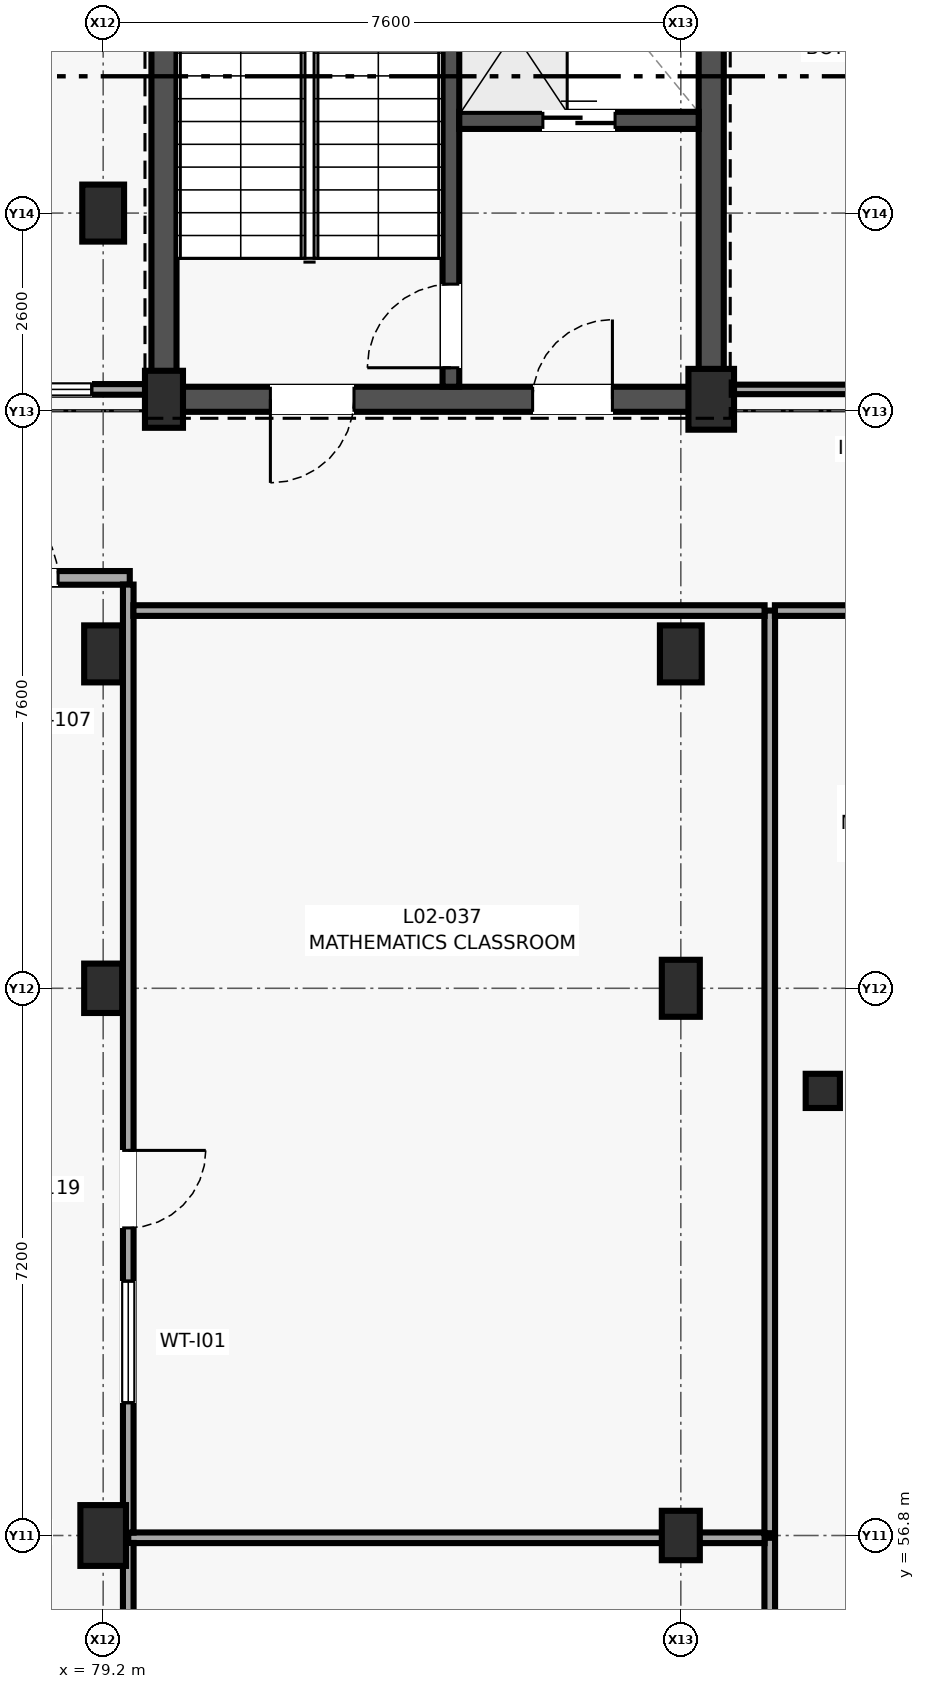
"""IFC4 building model, lengths in metres.
Left out: names, types, materials, properties, quantities, classifications, styles, units other than length and angle.
Written with IfcOpenShell. Run it as: python <this file> out.ifc"""

import sys

from ifc_helpers import new_model, si_unit, direction, frame, frame_2d, origin, origin_2d, place, context, subcontext, project, spatial, rectangle, circle, extrude, element, fill, save


model = new_model("IFC4")
c1 = context("Model", 3, precision=1e-05, world=origin(), true_north=direction((0.0, 1.0)))
c2 = subcontext(c1, "Body", "Model", "MODEL_VIEW")
j1 = project(units=[si_unit("LENGTHUNIT", "METRE"), si_unit("PLANEANGLEUNIT", "RADIAN")], contexts=[c1])
p1 = place(None, origin())
s1 = spatial("IfcSite", under=j1, at=p1, CompositionType="ELEMENT")
p2 = place(p1, origin())
s2 = spatial("IfcBuilding", under=s1, at=p2, CompositionType="ELEMENT")
p3 = place(p2, frame((0.0, 0.0, 8.2)))
s3 = spatial("IfcBuildingStorey", under=s2, at=p3, CompositionType="ELEMENT", Elevation=8.2)
p4 = place(p3, frame((79.2, 56.8, 0.0), z_axis=(0.0, 0.0, 1.0), x_axis=(1.0, 0.0, 0.0)))
e1 = element("IfcColumn", 1, at=p4, inside=s3, PredefinedType="COLUMN", context=c2, shape_type="SweptSolid", body=[
    extrude(rectangle(XDim=0.6, YDim=0.8, at=origin_2d()), origin(), (0.0, 0.0, 1.0), 4.0),
])
p5 = place(p3, frame((79.2, 64.0, 0.0), z_axis=(0.0, 0.0, 1.0), x_axis=(1.0, 0.0, 0.0)))
e2 = element("IfcColumn", 2, at=p5, inside=s3, PredefinedType="COLUMN", context=c2, shape_type="SweptSolid", body=[
    extrude(rectangle(XDim=0.5, YDim=0.65, at=origin_2d()), origin(), (0.0, 0.0, 1.0), 4.0),
])
p6 = place(p3, frame((79.2, 68.4, 0.0), z_axis=(0.0, 0.0, 1.0), x_axis=(1.0, 0.0, 0.0)))
e3 = element("IfcColumn", 3, at=p6, inside=s3, PredefinedType="COLUMN", context=c2, shape_type="SweptSolid", body=[
    extrude(rectangle(XDim=0.5, YDim=0.75, at=origin_2d()), origin(), (0.0, 0.0, 1.0), 4.0),
])
p7 = place(p3, frame((79.2, 74.2, 0.0), z_axis=(0.0, 0.0, 1.0), x_axis=(1.0, 0.0, 0.0)))
e4 = element("IfcColumn", 4, at=p7, inside=s3, PredefinedType="COLUMN", context=c2, shape_type="SweptSolid", body=[
    extrude(rectangle(XDim=0.55, YDim=0.75, at=origin_2d()), origin(), (0.0, 0.0, 1.0), 4.0),
])
p8 = place(p3, frame((80.0, 71.75, 0.0), z_axis=(0.0, 0.0, 1.0), x_axis=(1.0, 0.0, 0.0)))
e5 = element("IfcColumn", 5, at=p8, inside=s3, PredefinedType="COLUMN", context=c2, shape_type="SweptSolid", body=[
    extrude(rectangle(XDim=0.5, YDim=0.75, at=origin_2d()), origin(), (0.0, 0.0, 1.0), 4.0),
])
p9 = place(p3, frame((86.8, 56.8, 0.0), z_axis=(0.0, 0.0, 1.0), x_axis=(1.0, 0.0, 0.0)))
e6 = element("IfcColumn", 6, at=p9, inside=s3, PredefinedType="COLUMN", context=c2, shape_type="SweptSolid", body=[
    extrude(rectangle(XDim=0.5, YDim=0.65, at=origin_2d()), origin(), (0.0, 0.0, 1.0), 4.0),
])
p10 = place(p3, frame((86.8, 64.0, 0.0), z_axis=(0.0, 0.0, 1.0), x_axis=(1.0, 0.0, 0.0)))
e7 = element("IfcColumn", 7, at=p10, inside=s3, PredefinedType="COLUMN", context=c2, shape_type="SweptSolid", body=[
    extrude(rectangle(XDim=0.5, YDim=0.75, at=origin_2d()), origin(), (0.0, 0.0, 1.0), 4.0),
])
p11 = place(p3, frame((86.8, 68.4, 0.0), z_axis=(0.0, 0.0, 1.0), x_axis=(1.0, 0.0, 0.0)))
e8 = element("IfcColumn", 8, at=p11, inside=s3, PredefinedType="COLUMN", context=c2, shape_type="SweptSolid", body=[
    extrude(rectangle(XDim=0.55, YDim=0.75, at=origin_2d()), origin(), (0.0, 0.0, 1.0), 4.0),
])
p12 = place(p3, frame((87.2, 71.75, 0.0), z_axis=(0.0, 0.0, 1.0), x_axis=(1.0, 0.0, 0.0)))
e9 = element("IfcColumn", 9, at=p12, inside=s3, PredefinedType="COLUMN", context=c2, shape_type="SweptSolid", body=[
    extrude(rectangle(XDim=0.6, YDim=0.8, at=origin_2d()), origin(), (0.0, 0.0, 1.0), 4.0),
])
p13 = place(p3, frame((88.668, 62.65, 0.0), z_axis=(0.0, 0.0, 1.0), x_axis=(1.0, 0.0, 0.0)))
e10 = element("IfcColumn", 10, at=p13, inside=s3, PredefinedType="COLUMN", context=c2, shape_type="SweptSolid", body=[
    extrude(circle(Radius=0.225, at=origin_2d()), origin(), (0.0, 0.0, 1.0), 4.0),
])
p14 = place(p3, frame((79.835, 71.75, 0.0), z_axis=(0.0, 0.0, 1.0), x_axis=(1.0, 0.0, 0.0)))
e11 = element("IfcWall", 11, at=p14, inside=s3, PredefinedType="SHEAR", context=c2, shape_type="SweptSolid", body=[
    extrude(rectangle(XDim=7.53, YDim=0.33, at=frame_2d((3.765, 0.0))), origin(), (0.0, 0.0, 1.0), 3.78),
])
p15 = place(p14, frame((5.015, 0.0, 0.0)))
e12 = element("IfcOpeningElement", 12, at=p15, cuts=e11, PredefinedType="OPENING", context=c2, shape_type="SweptSolid", body=[
    extrude(rectangle(XDim=1.05, YDim=2.15, at=frame_2d((0.525, 1.075))), frame((0.0, 0.175, 0.0), z_axis=(0.0, -1.0, 0.0), x_axis=(1.0, 0.0, 0.0)), (0.0, 0.0, 1.0), 0.35),
])
p16 = place(p14, frame((1.565, 0.0, 0.0)))
e13 = element("IfcOpeningElement", 13, at=p16, cuts=e11, PredefinedType="OPENING", context=c2, shape_type="SweptSolid", body=[
    extrude(rectangle(XDim=1.1, YDim=2.15, at=frame_2d((0.55, 1.075))), frame((0.0, 0.175, 0.0), z_axis=(0.0, -1.0, 0.0), x_axis=(1.0, 0.0, 0.0)), (0.0, 0.0, 1.0), 0.35),
])
for number, where, z_axis, x_axis in (
    (14, (80.0, 71.915, 0.0), (0.0, 0.0, 1.0), (0.0, 1.0, 0.0)),
    (15, (87.2, 71.915, 0.0), (0.0, 0.0, 1.0), (0.0, 1.0, 0.0)),
):
    element("IfcWall", number, at=place(p3, frame(where, z_axis=z_axis, x_axis=x_axis)), inside=s3, PredefinedType="SHEAR", context=c2, shape_type="SweptSolid", body=[
        extrude(rectangle(XDim=7.47, YDim=0.33, at=frame_2d((3.735, 0.0))), origin(), (0.0, 0.0, 1.0), 3.78),
    ])
p17 = place(p3, frame((83.775, 71.915, 0.0), z_axis=(0.0, 0.0, 1.0), x_axis=(0.0, 1.0, 0.0)))
e16 = element("IfcWall", 16, at=p17, inside=s3, PredefinedType="SHEAR", context=c2, shape_type="SweptSolid", body=[
    extrude(rectangle(XDim=7.47, YDim=0.22, at=frame_2d((3.735, 0.0))), origin(), (0.0, 0.0, 1.0), 3.78),
])
p18 = place(p17, frame((0.25, 0.0, 0.0)))
e17 = element("IfcOpeningElement", 17, at=p18, cuts=e16, PredefinedType="OPENING", context=c2, shape_type="SweptSolid", body=[
    extrude(rectangle(XDim=1.1, YDim=2.15, at=frame_2d((0.55, 1.075))), frame((0.0, 0.12, 0.0), z_axis=(0.0, -1.0, 0.0), x_axis=(1.0, 0.0, 0.0)), (0.0, 0.0, 1.0), 0.24),
])
p19 = place(p3, frame((83.885, 75.42, 0.0), z_axis=(0.0, 0.0, 1.0), x_axis=(1.0, 0.0, 0.0)))
e18 = element("IfcWall", 18, at=p19, inside=s3, PredefinedType="SHEAR", context=c2, shape_type="SweptSolid", body=[
    extrude(rectangle(XDim=3.15, YDim=0.225, at=frame_2d((1.575, 0.0))), origin(), (0.0, 0.0, 1.0), 3.78),
])
p20 = place(p19, frame((1.1, 0.0, 0.0)))
e19 = element("IfcOpeningElement", 19, at=p20, cuts=e18, PredefinedType="OPENING", context=c2, shape_type="SweptSolid", body=[
    extrude(rectangle(XDim=0.95, YDim=2.15, at=frame_2d((0.475, 1.075))), frame((0.0, 0.123, 0.0), z_axis=(0.0, -1.0, 0.0), x_axis=(1.0, 0.0, 0.0)), (0.0, 0.0, 1.0), 0.245),
])
p21 = place(p3, frame((77.05, 69.4, 0.0), z_axis=(0.0, 0.0, 1.0), x_axis=(1.0, 0.0, 0.0)))
e20 = element("IfcWall", 20, at=p21, inside=s3, PredefinedType="PARTITIONING", context=c2, shape_type="SweptSolid", body=[
    extrude(rectangle(XDim=2.5, YDim=0.18, at=frame_2d((1.25, 0.0))), origin(), (0.0, 0.0, 1.0), 3.78),
])
p22 = place(p21, frame((0.507, 0.0, 0.0)))
e21 = element("IfcOpeningElement", 21, at=p22, cuts=e20, PredefinedType="OPENING", context=c2, shape_type="SweptSolid", body=[
    extrude(rectangle(XDim=1.05, YDim=2.15, at=frame_2d((0.525, 1.075))), frame((0.0, 0.1, 0.0), z_axis=(0.0, -1.0, 0.0), x_axis=(1.0, 0.0, 0.0)), (0.0, 0.0, 1.0), 0.2),
])
p23 = place(p3, frame((87.97, 44.698, 0.0), z_axis=(0.0, 0.0, 1.0), x_axis=(0.0, 1.0, 0.0)))
e22 = element("IfcWall", 22, at=p23, inside=s3, PredefinedType="PARTITIONING", context=c2, shape_type="SweptSolid", body=[
    extrude(rectangle(XDim=12.072, YDim=0.14, at=frame_2d((6.036, 0.0))), origin(), (0.0, 0.0, 1.0), 3.775),
])
p24 = place(p3, frame((87.902, 56.77, 0.0), z_axis=(0.0, 0.0, 1.0), x_axis=(-1.0, 0.0, 0.0)))
e23 = element("IfcWall", 23, at=p24, inside=s3, PredefinedType="PARTITIONING", context=c2, shape_type="SweptSolid", body=[
    extrude(rectangle(XDim=8.372, YDim=0.14, at=frame_2d((4.186, 0.0))), origin(), (0.0, 0.0, 1.0), 2.975),
])
p25 = place(p3, frame((79.53, 56.702, 0.0), z_axis=(0.0, 0.0, 1.0), x_axis=(0.0, -1.0, 0.0)))
e24 = element("IfcWall", 24, at=p25, inside=s3, PredefinedType="PARTITIONING", context=c2, shape_type="SweptSolid", body=[
    extrude(rectangle(XDim=12.004, YDim=0.14, at=frame_2d((6.002, 0.0))), origin(), (0.0, 0.0, 1.0), 3.775),
])
p26 = place(p25, frame((3.809, 0.0, 0.0)))
e25 = element("IfcOpeningElement", 25, at=p26, cuts=e24, PredefinedType="OPENING", context=c2, shape_type="SweptSolid", body=[
    extrude(rectangle(XDim=1.12, YDim=2.18, at=frame_2d((0.56, 1.09))), frame((0.0, 0.08, 0.0), z_axis=(0.0, -1.0, 0.0), x_axis=(1.0, 0.0, 0.0)), (0.0, 0.0, 1.0), 0.16),
])
p27 = place(p3, frame((79.53, 69.312, 0.0), z_axis=(0.0, 0.0, 1.0), x_axis=(0.0, -1.0, 0.0)))
e26 = element("IfcWall", 26, at=p27, inside=s3, PredefinedType="PARTITIONING", context=c2, shape_type="SweptSolid", body=[
    extrude(rectangle(XDim=12.474, YDim=0.14, at=frame_2d((6.237, 0.0))), origin(), (0.0, 0.0, 1.0), 3.775),
])
p28 = place(p27, frame((7.445, 0.0, 0.0)))
e27 = element("IfcOpeningElement", 27, at=p28, cuts=e26, PredefinedType="OPENING", context=c2, shape_type="SweptSolid", body=[
    extrude(rectangle(XDim=1.02, YDim=2.14, at=frame_2d((0.51, 1.07))), frame((0.0, 0.08, 0.0), z_axis=(0.0, -1.0, 0.0), x_axis=(1.0, 0.0, 0.0)), (0.0, 0.0, 1.0), 0.16),
])
p29 = place(p27, frame((9.165, 0.0, 1.05)))
e28 = element("IfcOpeningElement", 28, at=p29, cuts=e26, PredefinedType="OPENING", context=c2, shape_type="SweptSolid", body=[
    extrude(rectangle(XDim=1.6, YDim=1.1, at=frame_2d((0.8, 0.55))), frame((0.0, 0.08, 0.0), z_axis=(0.0, -1.0, 0.0), x_axis=(1.0, 0.0, 0.0)), (0.0, 0.0, 1.0), 0.16),
])
p30 = place(p3, frame((87.97, 56.83, 0.0), z_axis=(0.0, 0.0, 1.0), x_axis=(0.0, 1.0, 0.0)))
e29 = element("IfcWall", 29, at=p30, inside=s3, PredefinedType="PARTITIONING", context=c2, shape_type="SweptSolid", body=[
    extrude(rectangle(XDim=12.14, YDim=0.14, at=frame_2d((6.07, 0.0))), origin(), (0.0, 0.0, 1.0), 3.775),
])
p31 = place(p3, frame((87.902, 68.97, 0.0), z_axis=(0.0, 0.0, 1.0), x_axis=(-1.0, 0.0, 0.0)))
e30 = element("IfcWall", 30, at=p31, inside=s3, PredefinedType="PARTITIONING", context=c2, shape_type="SweptSolid", body=[
    extrude(rectangle(XDim=8.304, YDim=0.14, at=frame_2d((4.152, 0.0))), origin(), (0.0, 0.0, 1.0), 3.775),
])
p32 = place(p3, frame((98.77, 68.97, 0.0), z_axis=(0.0, 0.0, 1.0), x_axis=(-1.0, 0.0, 0.0)))
e31 = element("IfcWall", 31, at=p32, inside=s3, PredefinedType="PARTITIONING", context=c2, shape_type="SweptSolid", body=[
    extrude(rectangle(XDim=10.732, YDim=0.14, at=frame_2d((5.366, 0.0))), origin(), (0.0, 0.0, 1.0), 3.775),
])
p33 = place(p32, frame((4.826, 0.0, 0.0)))
e32 = element("IfcOpeningElement", 32, at=p33, cuts=e31, PredefinedType="OPENING", context=c2, shape_type="SweptSolid", body=[
    extrude(rectangle(XDim=1.08, YDim=2.16, at=frame_2d((0.54, 1.08))), frame((0.0, 0.08, 0.0), z_axis=(0.0, -1.0, 0.0), x_axis=(1.0, 0.0, 0.0)), (0.0, 0.0, 1.0), 0.16),
])
p34 = place(p32, frame((6.606, 0.0, 1.05)))
e33 = element("IfcOpeningElement", 33, at=p34, cuts=e31, PredefinedType="OPENING", context=c2, shape_type="SweptSolid", body=[
    extrude(rectangle(XDim=1.4, YDim=1.05, at=frame_2d((0.7, 0.525))), frame((0.0, 0.08, 0.0), z_axis=(0.0, -1.0, 0.0), x_axis=(1.0, 0.0, 0.0)), (0.0, 0.0, 1.0), 0.16),
])
p35 = place(p3, frame((87.43, 71.88, 0.0), z_axis=(0.0, 0.0, 1.0), x_axis=(1.0, 0.0, 0.0)))
e34 = element("IfcWall", 34, at=p35, inside=s3, PredefinedType="PARTITIONING", context=c2, shape_type="SweptSolid", body=[
    extrude(rectangle(XDim=4.279, YDim=0.125, at=frame_2d((2.14, 0.0))), origin(), (0.0, 0.0, 1.0), 3.775),
])
p36 = place(p35, frame((1.689, 0.0, 0.0)))
e35 = element("IfcOpeningElement", 35, at=p36, cuts=e34, PredefinedType="OPENING", context=c2, shape_type="SweptSolid", body=[
    extrude(rectangle(XDim=0.9, YDim=2.1, at=frame_2d((0.45, 1.05))), frame((0.0, 0.073, 0.0), z_axis=(0.0, -1.0, 0.0), x_axis=(1.0, 0.0, 0.0)), (0.0, 0.0, 1.0), 0.145),
])
p37 = place(p3, frame((72.43, 71.88, 0.0), z_axis=(0.0, 0.0, 1.0), x_axis=(1.0, 0.0, 0.0)))
e36 = element("IfcWall", 36, at=p37, inside=s3, PredefinedType="PARTITIONING", context=c2, shape_type="SweptSolid", body=[
    extrude(rectangle(XDim=7.34, YDim=0.14, at=frame_2d((3.67, 0.0))), origin(), (0.0, 0.0, 1.0), 3.775),
])
p38 = place(p37, frame((3.22, 0.0, 0.0)))
e37 = element("IfcOpeningElement", 37, at=p38, cuts=e36, PredefinedType="OPENING", context=c2, shape_type="SweptSolid", body=[
    extrude(rectangle(XDim=0.9, YDim=2.02, at=frame_2d((0.45, 1.01))), frame((0.0, 0.08, 0.0), z_axis=(0.0, -1.0, 0.0), x_axis=(1.0, 0.0, 0.0)), (0.0, 0.0, 1.0), 0.16),
])
p39 = place(p37, frame((4.82, 0.0, 1.05)))
e38 = element("IfcOpeningElement", 38, at=p39, cuts=e36, PredefinedType="OPENING", context=c2, shape_type="SweptSolid", body=[
    extrude(rectangle(XDim=1.8, YDim=1.2, at=frame_2d((0.9, 0.6))), frame((0.0, 0.08, 0.0), z_axis=(0.0, -1.0, 0.0), x_axis=(1.0, 0.0, 0.0)), (0.0, 0.0, 1.0), 0.16),
])
p40 = place(p20, origin())
e39 = element("IfcDoor", 39, at=p40, inside=s3, OperationType="SLIDING_TO_LEFT", PredefinedType="DOOR", context=c2, shape_type="SweptSolid", body=[
    extrude(rectangle(XDim=0.95, YDim=2.15, at=frame_2d((0.475, 1.075))), frame((0.0, 0.025, 0.0), z_axis=(0.0, -1.0, 0.0), x_axis=(1.0, 0.0, 0.0)), (0.0, 0.0, 1.0), 0.05),
])
fill(e19, e39)
p41 = place(p18, origin())
e40 = element("IfcDoor", 40, at=p41, inside=s3, OperationType="SINGLE_SWING_LEFT", PredefinedType="DOOR", context=c2, shape_type="SweptSolid", body=[
    extrude(rectangle(XDim=1.1, YDim=2.15, at=frame_2d((0.55, 1.075))), frame((0.0, 0.025, 0.0), z_axis=(0.0, -1.0, 0.0), x_axis=(1.0, 0.0, 0.0)), (0.0, 0.0, 1.0), 0.05),
])
fill(e17, e40)
p42 = place(p15, origin())
e41 = element("IfcDoor", 41, at=p42, inside=s3, OperationType="SINGLE_SWING_RIGHT", PredefinedType="DOOR", context=c2, shape_type="SweptSolid", body=[
    extrude(rectangle(XDim=1.05, YDim=2.15, at=frame_2d((0.525, 1.075))), frame((0.0, 0.025, 0.0), z_axis=(0.0, -1.0, 0.0), x_axis=(1.0, 0.0, 0.0)), (0.0, 0.0, 1.0), 0.05),
])
fill(e12, e41)
p43 = place(p16, frame((1.1, 0.0, 0.0), z_axis=(0.0, 0.0, 1.0), x_axis=(-1.0, 0.0, 0.0)))
e42 = element("IfcDoor", 42, at=p43, inside=s3, OperationType="SINGLE_SWING_LEFT", PredefinedType="DOOR", context=c2, shape_type="SweptSolid", body=[
    extrude(rectangle(XDim=1.1, YDim=2.15, at=frame_2d((0.55, 1.075))), frame((0.0, 0.025, 0.0), z_axis=(0.0, -1.0, 0.0), x_axis=(1.0, 0.0, 0.0)), (0.0, 0.0, 1.0), 0.05),
])
fill(e13, e42)
p44 = place(p22, origin())
e43 = element("IfcDoor", 43, at=p44, inside=s3, OperationType="SINGLE_SWING_LEFT", PredefinedType="DOOR", context=c2, shape_type="SweptSolid", body=[
    extrude(rectangle(XDim=1.05, YDim=2.15, at=frame_2d((0.525, 1.075))), frame((0.0, 0.025, 0.0), z_axis=(0.0, -1.0, 0.0), x_axis=(1.0, 0.0, 0.0)), (0.0, 0.0, 1.0), 0.05),
])
fill(e21, e43)
p45 = place(p28, origin())
e44 = element("IfcDoor", 44, at=p45, inside=s3, OperationType="SINGLE_SWING_LEFT", PredefinedType="DOOR", context=c2, shape_type="SweptSolid", body=[
    extrude(rectangle(XDim=1.02, YDim=2.14, at=frame_2d((0.51, 1.07))), frame((0.0, 0.025, 0.0), z_axis=(0.0, -1.0, 0.0), x_axis=(1.0, 0.0, 0.0)), (0.0, 0.0, 1.0), 0.05),
])
fill(e27, e44)
p46 = place(p29, origin())
e45 = element("IfcWindow", 45, at=p46, inside=s3, PartitioningType="SINGLE_PANEL", PredefinedType="WINDOW", context=c2, shape_type="SweptSolid", body=[
    extrude(rectangle(XDim=1.6, YDim=1.1, at=frame_2d((0.8, 0.55))), frame((0.0, 0.03, 0.0), z_axis=(0.0, -1.0, 0.0), x_axis=(1.0, 0.0, 0.0)), (0.0, 0.0, 1.0), 0.06),
])
fill(e28, e45)
p47 = place(p39, origin())
e46 = element("IfcWindow", 46, at=p47, inside=s3, PartitioningType="SINGLE_PANEL", PredefinedType="WINDOW", context=c2, shape_type="SweptSolid", body=[
    extrude(rectangle(XDim=1.8, YDim=1.2, at=frame_2d((0.9, 0.6))), frame((0.0, 0.03, 0.0), z_axis=(0.0, -1.0, 0.0), x_axis=(1.0, 0.0, 0.0)), (0.0, 0.0, 1.0), 0.06),
])
fill(e38, e46)
save(model, sys.argv[1])
